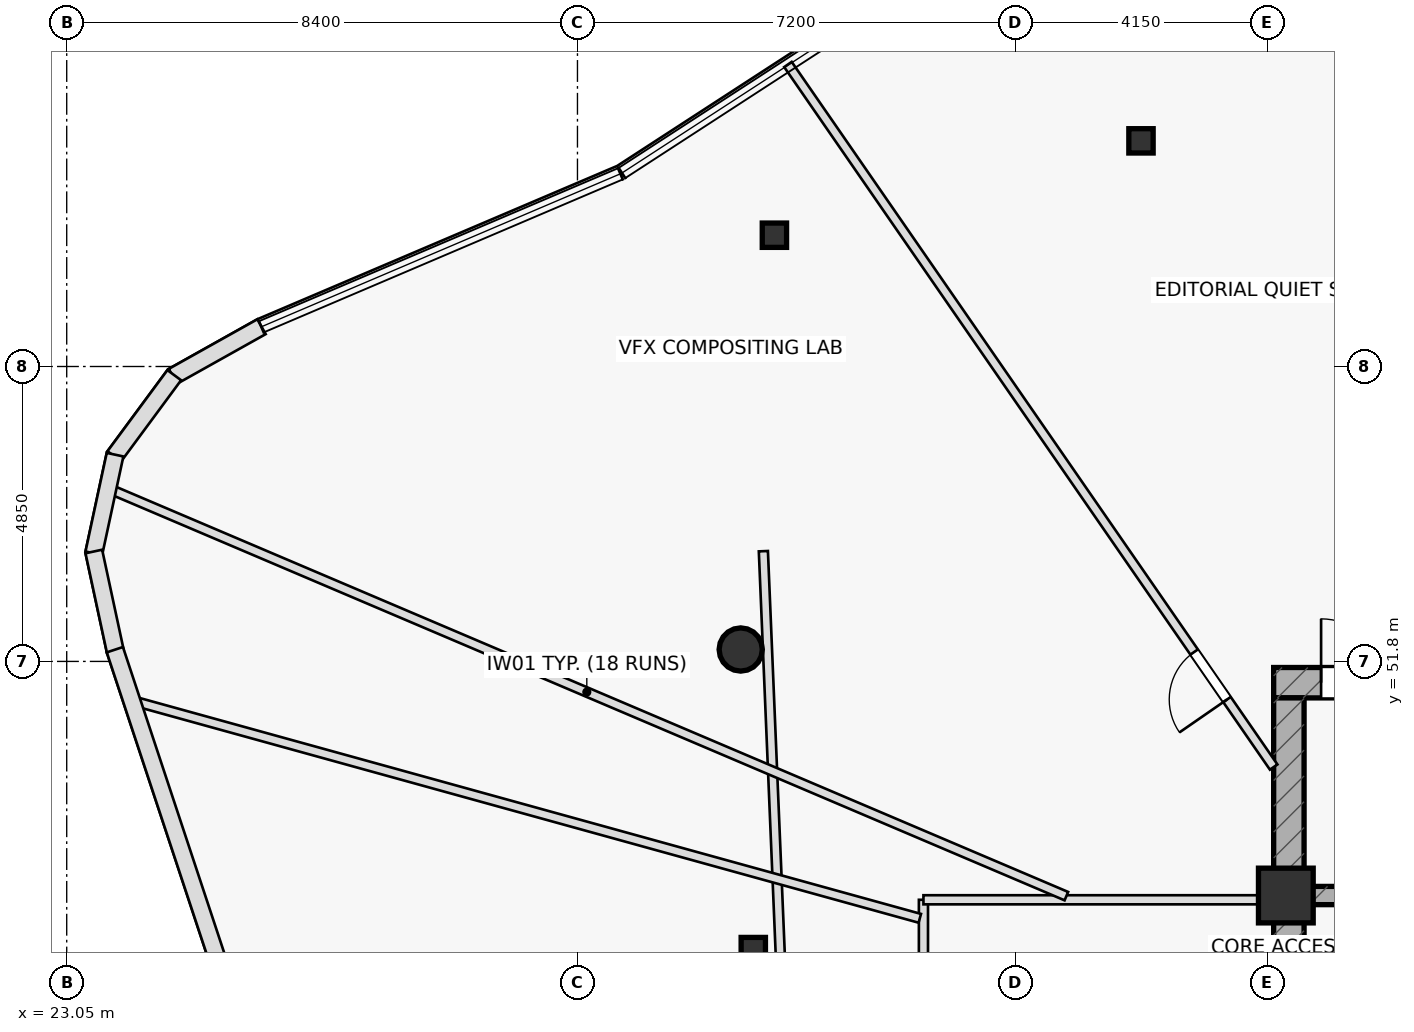
"""IFC4 building model, lengths in metres.
Left out: names, types, materials, properties, quantities, classifications, styles, units other than length and angle.
Written with IfcOpenShell. Run it as: python <this file> out.ifc"""

import sys

from ifc_helpers import new_model, si_unit, direction, frame, frame_2d, origin, origin_2d, place, context, subcontext, project, spatial, rectangle, hollow_rectangle, hollow_circle, extrude, element, fill, save


model = new_model("IFC4")
c1 = context("Model", 3, precision=1e-05, world=origin(), true_north=direction((0.0, 1.0)))
c2 = subcontext(c1, "Body", "Model", "MODEL_VIEW")
j1 = project(units=[si_unit("LENGTHUNIT", "METRE"), si_unit("PLANEANGLEUNIT", "RADIAN")], contexts=[c1])
p1 = place(None, origin())
s1 = spatial("IfcSite", under=j1, at=p1, CompositionType="ELEMENT")
p2 = place(p1, origin())
s2 = spatial("IfcBuilding", under=s1, at=p2, CompositionType="ELEMENT")
p3 = place(p2, frame((0.0, 0.0, 321.5)))
s3 = spatial("IfcBuildingStorey", under=s2, at=p3, CompositionType="ELEMENT", Elevation=321.5)
p4 = place(p3, frame((42.9, 51.45, 0.0), z_axis=(0.0, 0.0, 1.0), x_axis=(1.0, 0.0, 0.0)))
e1 = element("IfcWall", 1, at=p4, inside=s3, PredefinedType="SHEAR", context=c2, shape_type="SweptSolid", body=[
    extrude(rectangle(XDim=14.2, YDim=0.5, at=frame_2d((7.1, 0.0))), origin(), (0.0, 0.0, 1.0), 3.55),
])
p5 = place(p4, frame((0.78, 0.0, 0.0)))
e2 = element("IfcOpeningElement", 2, at=p5, cuts=e1, PredefinedType="OPENING", context=c2, shape_type="SweptSolid", body=[
    extrude(rectangle(XDim=1.05, YDim=2.2, at=frame_2d((0.525, 1.1))), frame((0.0, 0.26, 0.0), z_axis=(0.0, -1.0, 0.0), x_axis=(1.0, 0.0, 0.0)), (0.0, 0.0, 1.0), 0.52),
])
p6 = place(p3, frame((43.15, 38.8, 0.0), z_axis=(0.0, 0.0, 1.0), x_axis=(0.0, 1.0, 0.0)))
e3 = element("IfcWall", 3, at=p6, inside=s3, PredefinedType="SHEAR", context=c2, shape_type="SweptSolid", body=[
    extrude(rectangle(XDim=12.4, YDim=0.5, at=frame_2d((6.2, 0.0))), origin(), (0.0, 0.0, 1.0), 3.55),
])
p7 = place(p3, frame((43.4, 47.95, 0.0), z_axis=(0.0, 0.0, 1.0), x_axis=(1.0, 0.0, 0.0)))
e4 = element("IfcWall", 4, at=p7, inside=s3, PredefinedType="SHEAR", context=c2, shape_type="SweptSolid", body=[
    extrude(rectangle(XDim=13.2, YDim=0.3, at=frame_2d((6.6, 0.0))), origin(), (0.0, 0.0, 1.0), 3.55),
])
p8 = place(p7, frame((8.345, 0.0, 0.0)))
e5 = element("IfcOpeningElement", 5, at=p8, cuts=e4, PredefinedType="OPENING", context=c2, shape_type="SweptSolid", body=[
    extrude(rectangle(XDim=1.15, YDim=2.2, at=frame_2d((0.575, 1.1))), frame((0.0, 0.16, 0.0), z_axis=(0.0, -1.0, 0.0), x_axis=(1.0, 0.0, 0.0)), (0.0, 0.0, 1.0), 0.32),
])
p9 = place(p7, frame((10.065, 0.0, 0.0)))
e6 = element("IfcOpeningElement", 6, at=p9, cuts=e4, PredefinedType="OPENING", context=c2, shape_type="SweptSolid", body=[
    extrude(rectangle(XDim=1.15, YDim=2.2, at=frame_2d((0.575, 1.1))), frame((0.0, 0.16, 0.0), z_axis=(0.0, -1.0, 0.0), x_axis=(1.0, 0.0, 0.0)), (0.0, 0.0, 1.0), 0.32),
])
p10 = place(p7, frame((11.645, 0.0, 0.0)))
e7 = element("IfcOpeningElement", 7, at=p10, cuts=e4, PredefinedType="OPENING", context=c2, shape_type="SweptSolid", body=[
    extrude(rectangle(XDim=1.15, YDim=2.2, at=frame_2d((0.575, 1.1))), frame((0.0, 0.16, 0.0), z_axis=(0.0, -1.0, 0.0), x_axis=(1.0, 0.0, 0.0)), (0.0, 0.0, 1.0), 0.32),
])
p11 = place(p3, frame((43.1, 47.95, 0.0), z_axis=(0.0, 0.0, 1.0), x_axis=(1.0, 0.0, 0.0)))
e8 = element("IfcColumn", 8, at=p11, inside=s3, PredefinedType="COLUMN", context=c2, shape_type="SweptSolid", body=[
    extrude(rectangle(XDim=0.9, YDim=0.9, at=origin_2d()), origin(), (0.0, 0.0, 1.0), 3.55),
])
p12 = place(p3, frame((34.135, 51.996, 0.0), z_axis=(0.0, 0.0, 1.0), x_axis=(1.0, 0.0, 0.0)))
e9 = element("IfcColumn", 9, at=p12, inside=s3, PredefinedType="COLUMN", context=c2, shape_type="SweptSolid", body=[
    extrude(hollow_circle(Radius=0.355, WallThickness=0.032, at=origin_2d()), origin(), (0.0, 0.0, 1.0), 3.55),
])
for number, where, z_axis, x_axis in (
    (10, (34.342, 47.061, 0.0), (0.0, 0.0, 1.0), (1.0, 0.0, 0.0)),
    (11, (40.718, 60.361, 0.0), (0.0, 0.0, 1.0), (1.0, 0.0, 0.0)),
    (12, (34.689, 58.809, 0.0), (0.0, 0.0, 1.0), (1.0, 0.0, 0.0)),
):
    element("IfcColumn", number, at=place(p3, frame(where, z_axis=z_axis, x_axis=x_axis)), inside=s3, PredefinedType="COLUMN", context=c2, shape_type="SweptSolid", body=[
        extrude(hollow_rectangle(XDim=0.4, YDim=0.4, WallThickness=0.025, at=origin_2d()), origin(), (0.0, 0.0, 1.0), 3.55),
    ])
p13 = place(p3, frame((34.507, 53.613, 0.0), z_axis=(0.0, 0.0, 1.0), x_axis=(0.041875090182, -0.999122853718, 0.0)))
e13 = element("IfcWall", 13, at=p13, inside=s3, PredefinedType="PARTITIONING", context=c2, shape_type="SweptSolid", body=[
    extrude(rectangle(XDim=8.139, YDim=0.15, at=frame_2d((4.069, 0.0))), origin(), (0.0, 0.0, 1.0), 3.125),
])
p14 = place(p3, frame((37.14, 40.3, 0.0), z_axis=(0.0, 0.0, 1.0), x_axis=(0.0, 1.0, 0.0)))
e14 = element("IfcWall", 14, at=p14, inside=s3, PredefinedType="PARTITIONING", context=c2, shape_type="SweptSolid", body=[
    extrude(rectangle(XDim=7.58, YDim=0.15, at=frame_2d((3.79, 0.0))), origin(), (0.0, 0.0, 1.0), 3.55),
])
p15 = place(p3, frame((37.14, 47.88, 0.0), z_axis=(0.0, 0.0, 1.0), x_axis=(1.0, 0.0, 0.0)))
e15 = element("IfcWall", 15, at=p15, inside=s3, PredefinedType="PARTITIONING", context=c2, shape_type="SweptSolid", body=[
    extrude(rectangle(XDim=5.76, YDim=0.15, at=frame_2d((2.88, 0.0))), origin(), (0.0, 0.0, 1.0), 3.55),
])
p16 = place(p3, frame((42.9, 50.062, 0.0), z_axis=(0.0, 0.0, 1.0), x_axis=(-0.568663071572, 0.822570550792, 0.0)))
e16 = element("IfcWall", 16, at=p16, inside=s3, PredefinedType="PARTITIONING", context=c2, shape_type="SweptSolid", body=[
    extrude(rectangle(XDim=14.047, YDim=0.15, at=frame_2d((7.023, 0.0))), origin(), (0.0, 0.0, 1.0), 3.075),
])
p17 = place(p16, frame((1.35, 0.0, 0.0)))
e17 = element("IfcOpeningElement", 17, at=p17, cuts=e16, PredefinedType="OPENING", context=c2, shape_type="SweptSolid", body=[
    extrude(rectangle(XDim=0.95, YDim=2.05, at=frame_2d((0.475, 1.025))), frame((0.0, 0.085, 0.0), z_axis=(0.0, -1.0, 0.0), x_axis=(1.0, 0.0, 0.0)), (0.0, 0.0, 1.0), 0.17),
])
p18 = place(p3, frame((39.49, 47.94, 0.0), z_axis=(0.0, 0.0, 1.0), x_axis=(-0.920160749364, 0.391540796507, 0.0)))
e18 = element("IfcWall", 18, at=p18, inside=s3, PredefinedType="PARTITIONING", context=c2, shape_type="SweptSolid", body=[
    extrude(rectangle(XDim=17.142, YDim=0.15, at=frame_2d((8.571, 0.0))), origin(), (0.0, 0.0, 1.0), 3.075),
])
p19 = place(p3, frame((37.08, 47.575, 0.0), z_axis=(0.0, 0.0, 1.0), x_axis=(-0.963875151347, 0.266354449215, 0.0)))
e19 = element("IfcWall", 19, at=p19, inside=s3, PredefinedType="PARTITIONING", context=c2, shape_type="SweptSolid", body=[
    extrude(rectangle(XDim=13.459, YDim=0.15, at=frame_2d((6.73, 0.0))), origin(), (0.0, 0.0, 1.0), 3.075),
])
p20 = place(p3, frame((26.254, 57.304, 0.0), z_axis=(0.0, 0.0, 1.0), x_axis=(-0.872518476732, -0.48858111687, 0.0)))
e20 = element("IfcWall", 20, at=p20, inside=s3, PredefinedType="STANDARD", context=c2, shape_type="SweptSolid", body=[
    extrude(rectangle(XDim=1.67, YDim=0.28, at=frame_2d((0.835, 0.0))), origin(), (0.0, 0.0, 1.0), 3.55),
])
for number, where, z_axis, x_axis in (
    (21, (24.818, 56.508, 0.0), (0.0, 0.0, 1.0), (-0.594, -0.804, 0.0)),
    (22, (23.845, 55.2, 0.0), (0.0, 0.0, 1.0), (-0.21, -0.978, 0.0)),
):
    element("IfcWall", number, at=place(p3, frame(where, z_axis=z_axis, x_axis=x_axis)), inside=s3, PredefinedType="STANDARD", context=c2, shape_type="SweptSolid", body=[
        extrude(rectangle(XDim=1.659, YDim=0.28, at=frame_2d((0.83, 0.0))), origin(), (0.0, 0.0, 1.0), 3.55),
    ])
p21 = place(p3, frame((23.496, 53.608, 0.0), z_axis=(0.0, 0.0, 1.0), x_axis=(0.210391694938, -0.977617171853, 0.0)))
e23 = element("IfcWall", 23, at=p21, inside=s3, PredefinedType="STANDARD", context=c2, shape_type="SweptSolid", body=[
    extrude(rectangle(XDim=1.681, YDim=0.28, at=frame_2d((0.841, 0.0))), origin(), (0.0, 0.0, 1.0), 3.55),
])
p22 = place(p3, frame((23.842, 51.993, 0.0), z_axis=(0.0, 0.0, 1.0), x_axis=(0.314363028612, -0.949302842217, 0.0)))
e24 = element("IfcWall", 24, at=p22, inside=s3, PredefinedType="STANDARD", context=c2, shape_type="SweptSolid", body=[
    extrude(rectangle(XDim=6.444, YDim=0.28, at=frame_2d((3.222, 0.0))), origin(), (0.0, 0.0, 1.0), 3.55),
])
p23 = place(p5, origin())
e25 = element("IfcDoor", 25, at=p23, inside=s3, OperationType="SINGLE_SWING_LEFT", PredefinedType="DOOR", context=c2, shape_type="SweptSolid", body=[
    extrude(rectangle(XDim=1.05, YDim=2.2, at=frame_2d((0.525, 1.1))), frame((0.0, 0.025, 0.0), z_axis=(0.0, -1.0, 0.0), x_axis=(1.0, 0.0, 0.0)), (0.0, 0.0, 1.0), 0.05),
])
fill(e2, e25)
p24 = place(p17, origin())
e26 = element("IfcDoor", 26, at=p24, inside=s3, OperationType="SINGLE_SWING_LEFT", PredefinedType="DOOR", context=c2, shape_type="SweptSolid", body=[
    extrude(rectangle(XDim=0.95, YDim=2.05, at=frame_2d((0.475, 1.025))), frame((0.0, 0.025, 0.0), z_axis=(0.0, -1.0, 0.0), x_axis=(1.0, 0.0, 0.0)), (0.0, 0.0, 1.0), 0.05),
])
fill(e17, e26)
save(model, sys.argv[1])
